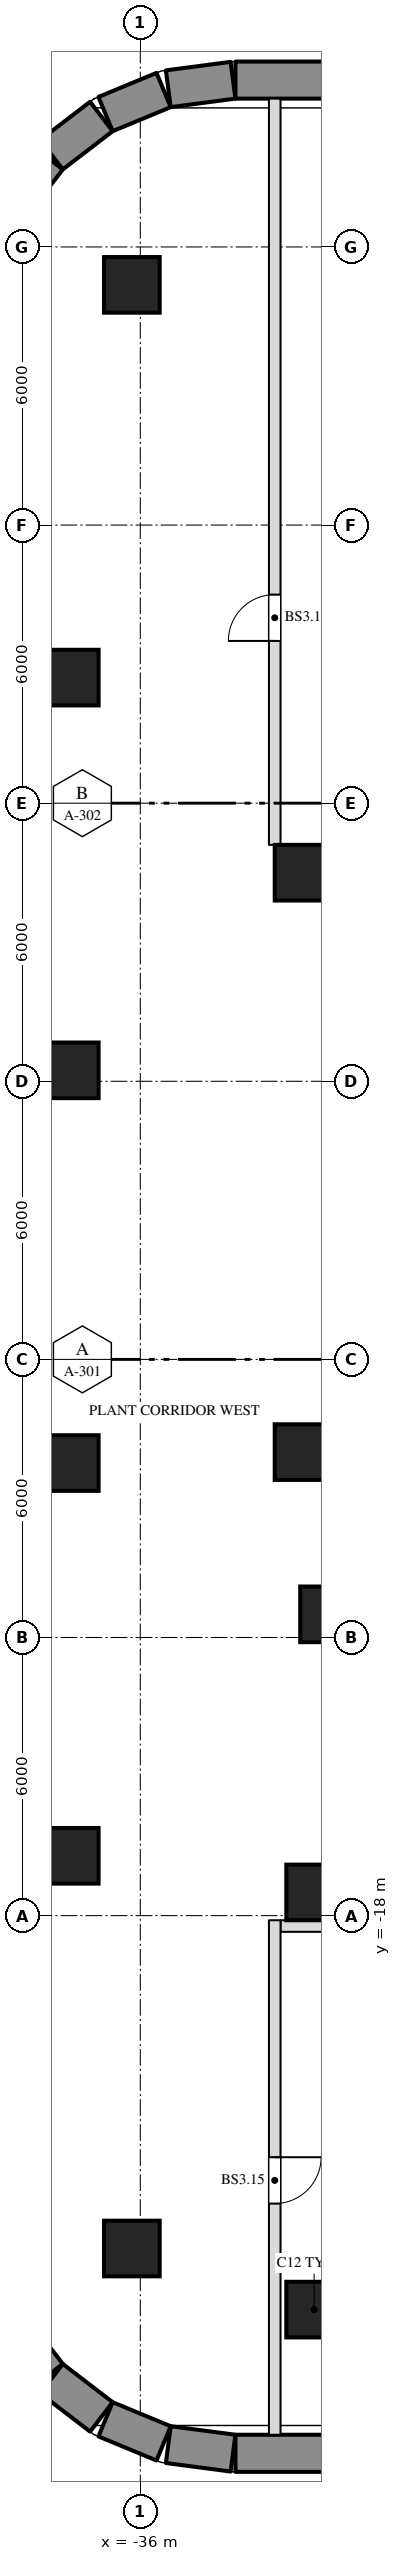
"""IFC4 building model, lengths in metres.
Left out: names, types, materials, properties, quantities, classifications, styles, units other than length and angle.
Written with IfcOpenShell. Run it as: python <this file> out.ifc"""

import sys

from ifc_helpers import new_model, si_unit, direction, frame, frame_2d, origin, origin_2d, place, context, subcontext, project, spatial, rectangle, extrude, element, fill, save


model = new_model("IFC4")
c1 = context("Model", 3, precision=1e-05, world=origin(), true_north=direction((0.0, 1.0)))
c2 = subcontext(c1, "Body", "Model", "MODEL_VIEW")
j1 = project(units=[si_unit("LENGTHUNIT", "METRE"), si_unit("PLANEANGLEUNIT", "RADIAN")], contexts=[c1])
p1 = place(None, origin())
s1 = spatial("IfcSite", under=j1, at=p1, CompositionType="ELEMENT")
p2 = place(p1, origin())
s2 = spatial("IfcBuilding", under=s1, at=p2, CompositionType="ELEMENT")
p3 = place(p2, frame((0.0, 0.0, -12.6)))
s3 = spatial("IfcBuildingStorey", under=s2, at=p3, CompositionType="ELEMENT", Elevation=-12.6)
p4 = place(p3, frame((33.948, -29.6, 0.0), z_axis=(0.0, 0.0, 1.0), x_axis=(-1.0, 0.0, 0.0)))
e1 = element("IfcWall", 1, at=p4, inside=s3, PredefinedType="SOLIDWALL", context=c2, shape_type="SweptSolid", body=[
    extrude(rectangle(XDim=67.895, YDim=0.8, at=frame_2d((33.948, 0.0))), origin(), (0.0, 0.0, 1.0), 4.2),
])
p5 = place(p3, frame((-34.0, -29.597, 0.0), z_axis=(0.0, 0.0, 1.0), x_axis=(-0.99144603414, 0.130517283865, 0.0)))
e2 = element("IfcWall", 2, at=p5, inside=s3, PredefinedType="SOLIDWALL", context=c2, shape_type="SweptSolid", body=[
    extrude(rectangle(XDim=1.408, YDim=0.8, at=frame_2d((0.704, 0.0))), origin(), (0.0, 0.0, 1.0), 4.2),
])
for number, where, z_axis, x_axis in (
    (3, (-35.497, -29.386, 0.0), (0.0, 0.0, 1.0), (-0.924, 0.383, 0.0)),
    (4, (-36.84, -28.815, 0.0), (0.0, 0.0, 1.0), (-0.793, 0.609, 0.0)),
    (5, (-37.99, -27.916, 0.0), (0.0, 0.0, 1.0), (-0.609, 0.793, 0.0)),
    (6, (-38.815, 18.84, 0.0), (0.0, 0.0, 1.0), (0.609, 0.793, 0.0)),
    (7, (-37.916, 19.99, 0.0), (0.0, 0.0, 1.0), (0.793, 0.609, 0.0)),
    (8, (-36.75, 20.867, 0.0), (0.0, 0.0, 1.0), (0.924, 0.383, 0.0)),
):
    element("IfcWall", number, at=place(p3, frame(where, z_axis=z_axis, x_axis=x_axis)), inside=s3, PredefinedType="SOLIDWALL", context=c2, shape_type="SweptSolid", body=[
        extrude(rectangle(XDim=1.355, YDim=0.8, at=frame_2d((0.678, 0.0))), origin(), (0.0, 0.0, 1.0), 4.2),
    ])
p6 = place(p3, frame((-35.396, 21.413, 0.0), z_axis=(0.0, 0.0, 1.0), x_axis=(0.99144603414, 0.130517283865, 0.0)))
e9 = element("IfcWall", 9, at=p6, inside=s3, PredefinedType="SOLIDWALL", context=c2, shape_type="SweptSolid", body=[
    extrude(rectangle(XDim=1.408, YDim=0.8, at=frame_2d((0.704, 0.0))), origin(), (0.0, 0.0, 1.0), 4.2),
])
p7 = place(p3, frame((-33.948, 21.6, 0.0), z_axis=(0.0, 0.0, 1.0), x_axis=(1.0, 0.0, 0.0)))
e10 = element("IfcWall", 10, at=p7, inside=s3, PredefinedType="SOLIDWALL", context=c2, shape_type="SweptSolid", body=[
    extrude(rectangle(XDim=67.895, YDim=0.8, at=frame_2d((33.948, 0.0))), origin(), (0.0, 0.0, 1.0), 4.2),
])
for number, where, z_axis, x_axis in (
    (11, (-32.25, -26.5, 0.0), (0.0, 0.0, 1.0), (1.0, 0.0, 0.0)),
    (12, (-36.182, -25.182, 0.0), (0.0, 0.0, 1.0), (1.0, 0.0, 0.0)),
    (13, (-32.25, -17.5, 0.0), (0.0, 0.0, 1.0), (1.0, 0.0, 0.0)),
    (14, (-37.5, -16.709, 0.0), (0.0, 0.0, 1.0), (1.0, 0.0, 0.0)),
    (15, (-31.95, -11.5, 0.0), (0.0, 0.0, 1.0), (1.0, 0.0, 0.0)),
    (16, (-37.5, -8.236, 0.0), (0.0, 0.0, 1.0), (1.0, 0.0, 0.0)),
    (17, (-32.5, -8.0, 0.0), (0.0, 0.0, 1.0), (1.0, 0.0, 0.0)),
    (18, (-37.5, 0.236, 0.0), (0.0, 0.0, 1.0), (1.0, 0.0, 0.0)),
    (19, (-32.5, 4.5, 0.0), (0.0, 0.0, 1.0), (1.0, 0.0, 0.0)),
    (20, (-37.5, 8.709, 0.0), (0.0, 0.0, 1.0), (1.0, 0.0, 0.0)),
    (21, (-36.182, 17.182, 0.0), (0.0, 0.0, 1.0), (1.0, 0.0, 0.0)),
):
    element("IfcColumn", number, at=place(p3, frame(where, z_axis=z_axis, x_axis=x_axis)), inside=s3, PredefinedType="COLUMN", context=c2, shape_type="SweptSolid", body=[
        extrude(rectangle(XDim=1.2, YDim=1.2, at=origin_2d()), origin(), (0.0, 0.0, 1.0), 4.2),
    ])
p8 = place(p3, frame((-32.975, -18.225, 0.0), z_axis=(0.0, 0.0, 1.0), x_axis=(1.0, 0.0, 0.0)))
e22 = element("IfcWall", 22, at=p8, inside=s3, PredefinedType="SOLIDWALL", context=c2, shape_type="SweptSolid", body=[
    extrude(rectangle(XDim=65.95, YDim=0.25, at=frame_2d((32.975, 0.0))), origin(), (0.0, 0.0, 1.0), 3.9),
])
p9 = place(p8, frame((2.425, 0.0, 0.0)))
e23 = element("IfcOpeningElement", 23, at=p9, cuts=e22, PredefinedType="OPENING", context=c2, shape_type="SweptSolid", body=[
    extrude(rectangle(XDim=1.0, YDim=2.1, at=frame_2d((0.5, 1.05))), frame((0.0, 0.137, 0.0), z_axis=(0.0, -1.0, 0.0), x_axis=(1.0, 0.0, 0.0)), (0.0, 0.0, 1.0), 0.274),
])
p10 = place(p8, frame((9.575, 0.0, 0.0)))
e24 = element("IfcOpeningElement", 24, at=p10, cuts=e22, PredefinedType="OPENING", context=c2, shape_type="SweptSolid", body=[
    extrude(rectangle(XDim=1.8, YDim=2.1, at=frame_2d((0.9, 1.05))), frame((0.0, 0.137, 0.0), z_axis=(0.0, -1.0, 0.0), x_axis=(1.0, 0.0, 0.0)), (0.0, 0.0, 1.0), 0.274),
])
p11 = place(p8, frame((18.575, 0.0, 0.0)))
e25 = element("IfcOpeningElement", 25, at=p11, cuts=e22, PredefinedType="OPENING", context=c2, shape_type="SweptSolid", body=[
    extrude(rectangle(XDim=1.8, YDim=2.1, at=frame_2d((0.9, 1.05))), frame((0.0, 0.137, 0.0), z_axis=(0.0, -1.0, 0.0), x_axis=(1.0, 0.0, 0.0)), (0.0, 0.0, 1.0), 0.274),
])
p12 = place(p8, frame((33.575, 0.0, 0.0)))
e26 = element("IfcOpeningElement", 26, at=p12, cuts=e22, PredefinedType="OPENING", context=c2, shape_type="SweptSolid", body=[
    extrude(rectangle(XDim=1.8, YDim=2.1, at=frame_2d((0.9, 1.05))), frame((0.0, 0.137, 0.0), z_axis=(0.0, -1.0, 0.0), x_axis=(1.0, 0.0, 0.0)), (0.0, 0.0, 1.0), 0.274),
])
p13 = place(p8, frame((51.575, 0.0, 0.0)))
e27 = element("IfcOpeningElement", 27, at=p13, cuts=e22, PredefinedType="OPENING", context=c2, shape_type="SweptSolid", body=[
    extrude(rectangle(XDim=1.8, YDim=2.1, at=frame_2d((0.9, 1.05))), frame((0.0, 0.137, 0.0), z_axis=(0.0, -1.0, 0.0), x_axis=(1.0, 0.0, 0.0)), (0.0, 0.0, 1.0), 0.274),
])
p14 = place(p8, frame((62.525, 0.0, 0.0)))
e28 = element("IfcOpeningElement", 28, at=p14, cuts=e22, PredefinedType="OPENING", context=c2, shape_type="SweptSolid", body=[
    extrude(rectangle(XDim=1.0, YDim=2.1, at=frame_2d((0.5, 1.05))), frame((0.0, 0.137, 0.0), z_axis=(0.0, -1.0, 0.0), x_axis=(1.0, 0.0, 0.0)), (0.0, 0.0, 1.0), 0.274),
])
p15 = place(p3, frame((-33.1, -29.2, 0.0), z_axis=(0.0, 0.0, 1.0), x_axis=(0.0, 1.0, 0.0)))
e29 = element("IfcWall", 29, at=p15, inside=s3, PredefinedType="SOLIDWALL", context=c2, shape_type="SweptSolid", body=[
    extrude(rectangle(XDim=11.1, YDim=0.25, at=frame_2d((5.55, 0.0))), origin(), (0.0, 0.0, 1.0), 3.9),
])
p16 = place(p15, frame((4.988, 0.0, 0.0)))
e30 = element("IfcOpeningElement", 30, at=p16, cuts=e29, PredefinedType="OPENING", context=c2, shape_type="SweptSolid", body=[
    extrude(rectangle(XDim=1.0, YDim=2.1, at=frame_2d((0.5, 1.05))), frame((0.0, 0.137, 0.0), z_axis=(0.0, -1.0, 0.0), x_axis=(1.0, 0.0, 0.0)), (0.0, 0.0, 1.0), 0.274),
])
p17 = place(p3, frame((-33.1, 5.1, 0.0), z_axis=(0.0, 0.0, 1.0), x_axis=(0.0, 1.0, 0.0)))
e31 = element("IfcWall", 31, at=p17, inside=s3, PredefinedType="SOLIDWALL", context=c2, shape_type="SweptSolid", body=[
    extrude(rectangle(XDim=16.1, YDim=0.25, at=frame_2d((8.05, 0.0))), origin(), (0.0, 0.0, 1.0), 3.9),
])
p18 = place(p17, frame((4.4, 0.0, 0.0)))
e32 = element("IfcOpeningElement", 32, at=p18, cuts=e31, PredefinedType="OPENING", context=c2, shape_type="SweptSolid", body=[
    extrude(rectangle(XDim=1.0, YDim=2.1, at=frame_2d((0.5, 1.05))), frame((0.0, 0.137, 0.0), z_axis=(0.0, -1.0, 0.0), x_axis=(1.0, 0.0, 0.0)), (0.0, 0.0, 1.0), 0.274),
])
p19 = place(p16, origin())
e33 = element("IfcDoor", 33, at=p19, inside=s3, OperationType="SINGLE_SWING_LEFT", PredefinedType="DOOR", context=c2, shape_type="SweptSolid", body=[
    extrude(rectangle(XDim=1.0, YDim=2.1, at=frame_2d((0.5, 1.05))), frame((0.0, 0.025, 0.0), z_axis=(0.0, -1.0, 0.0), x_axis=(1.0, 0.0, 0.0)), (0.0, 0.0, 1.0), 0.05),
])
fill(e30, e33)
p20 = place(p18, origin())
e34 = element("IfcDoor", 34, at=p20, inside=s3, OperationType="SINGLE_SWING_LEFT", PredefinedType="DOOR", context=c2, shape_type="SweptSolid", body=[
    extrude(rectangle(XDim=1.0, YDim=2.1, at=frame_2d((0.5, 1.05))), frame((0.0, 0.025, 0.0), z_axis=(0.0, -1.0, 0.0), x_axis=(1.0, 0.0, 0.0)), (0.0, 0.0, 1.0), 0.05),
])
fill(e32, e34)
save(model, sys.argv[1])
